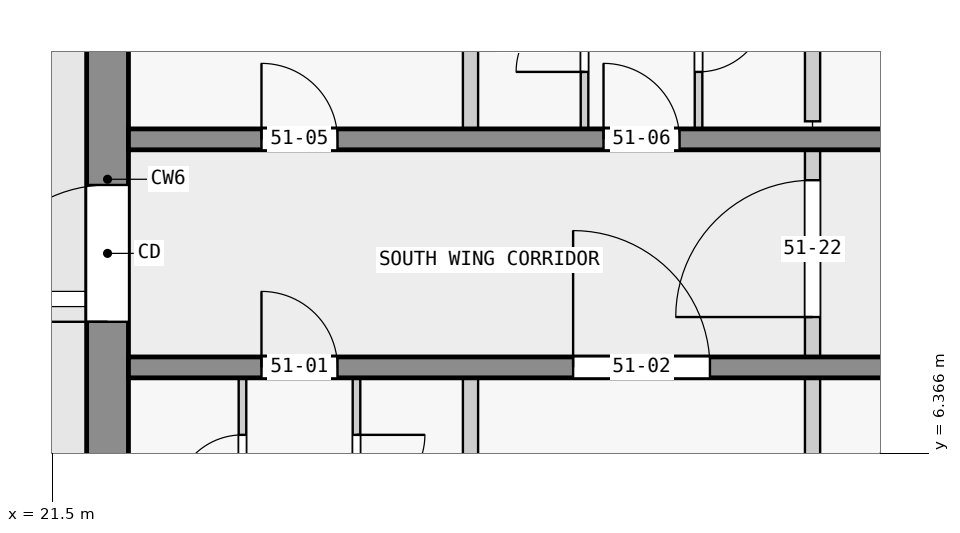
"""IFC4 building model, lengths in metres.
Left out: names, types, materials, properties, quantities, classifications, styles, units other than length and angle.
Written with IfcOpenShell. Run it as: python <this file> out.ifc"""

import sys

from ifc_helpers import new_model, si_unit, direction, frame, frame_2d, origin, place, context, subcontext, project, spatial, rectangle, extrude, element, fill, save


model = new_model("IFC4")
c1 = context("Model", 3, precision=1e-05, world=origin(), true_north=direction((0.0, 1.0)))
c2 = subcontext(c1, "Body", "Model", "MODEL_VIEW")
j1 = project(units=[si_unit("LENGTHUNIT", "METRE"), si_unit("PLANEANGLEUNIT", "RADIAN")], contexts=[c1])
p1 = place(None, origin())
s1 = spatial("IfcSite", under=j1, at=p1, CompositionType="ELEMENT")
p2 = place(p1, origin())
s2 = spatial("IfcBuilding", under=s1, at=p2, CompositionType="ELEMENT")
p3 = place(p2, frame((0.0, 0.0, 197.9)))
s3 = spatial("IfcBuildingStorey", under=s2, at=p3, CompositionType="ELEMENT", Elevation=197.9)
p4 = place(p3, frame((22.225, 2.5, 0.0), z_axis=(0.0, 0.0, 1.0), x_axis=(0.0, 1.0, 0.0)))
e1 = element("IfcWall", 1, at=p4, inside=s3, PredefinedType="SHEAR", context=c2, shape_type="SweptSolid", body=[
    extrude(rectangle(XDim=14.95, YDim=0.55, at=frame_2d((7.475, 0.0))), origin(), (0.0, 0.0, 1.0), 3.25),
])
p5 = place(p4, frame((5.6, 0.0, 0.0)))
e2 = element("IfcOpeningElement", 2, at=p5, cuts=e1, PredefinedType="OPENING", context=c2, shape_type="SweptSolid", body=[
    extrude(rectangle(XDim=1.8, YDim=2.1, at=frame_2d((0.9, 1.05))), frame((0.0, 0.285, 0.0), z_axis=(0.0, -1.0, 0.0), x_axis=(1.0, 0.0, 0.0)), (0.0, 0.0, 1.0), 0.57),
])
p6 = place(p3, frame((22.5, 7.5, 0.0), z_axis=(0.0, 0.0, 1.0), x_axis=(1.0, 0.0, 0.0)))
e3 = element("IfcWall", 3, at=p6, inside=s3, PredefinedType="SHEAR", context=c2, shape_type="SweptSolid", body=[
    extrude(rectangle(XDim=22.5, YDim=0.275, at=frame_2d((11.25, 0.0))), origin(), (0.0, 0.0, 1.0), 3.25),
])
p7 = place(p6, frame((1.75, 0.0, 0.0)))
e4 = element("IfcOpeningElement", 4, at=p7, cuts=e3, PredefinedType="OPENING", context=c2, shape_type="SweptSolid", body=[
    extrude(rectangle(XDim=1.0, YDim=2.1, at=frame_2d((0.5, 1.05))), frame((0.0, 0.147, 0.0), z_axis=(0.0, -1.0, 0.0), x_axis=(1.0, 0.0, 0.0)), (0.0, 0.0, 1.0), 0.295),
])
p8 = place(p6, frame((5.85, 0.0, 0.0)))
e5 = element("IfcOpeningElement", 5, at=p8, cuts=e3, PredefinedType="OPENING", context=c2, shape_type="SweptSolid", body=[
    extrude(rectangle(XDim=1.8, YDim=2.1, at=frame_2d((0.9, 1.05))), frame((0.0, 0.147, 0.0), z_axis=(0.0, -1.0, 0.0), x_axis=(1.0, 0.0, 0.0)), (0.0, 0.0, 1.0), 0.295),
])
p9 = place(p6, frame((10.75, 0.0, 0.0)))
e6 = element("IfcOpeningElement", 6, at=p9, cuts=e3, PredefinedType="OPENING", context=c2, shape_type="SweptSolid", body=[
    extrude(rectangle(XDim=1.0, YDim=2.1, at=frame_2d((0.5, 1.05))), frame((0.0, 0.147, 0.0), z_axis=(0.0, -1.0, 0.0), x_axis=(1.0, 0.0, 0.0)), (0.0, 0.0, 1.0), 0.295),
])
p10 = place(p6, frame((16.85, 0.0, 0.0)))
e7 = element("IfcOpeningElement", 7, at=p10, cuts=e3, PredefinedType="OPENING", context=c2, shape_type="SweptSolid", body=[
    extrude(rectangle(XDim=1.0, YDim=2.1, at=frame_2d((0.5, 1.05))), frame((0.0, 0.147, 0.0), z_axis=(0.0, -1.0, 0.0), x_axis=(1.0, 0.0, 0.0)), (0.0, 0.0, 1.0), 0.295),
])
p11 = place(p3, frame((22.5, 10.5, 0.0), z_axis=(0.0, 0.0, 1.0), x_axis=(1.0, 0.0, 0.0)))
e8 = element("IfcWall", 8, at=p11, inside=s3, PredefinedType="SHEAR", context=c2, shape_type="SweptSolid", body=[
    extrude(rectangle(XDim=22.5, YDim=0.275, at=frame_2d((11.25, 0.0))), origin(), (0.0, 0.0, 1.0), 3.25),
])
p12 = place(p11, frame((1.75, 0.0, 0.0)))
e9 = element("IfcOpeningElement", 9, at=p12, cuts=e8, PredefinedType="OPENING", context=c2, shape_type="SweptSolid", body=[
    extrude(rectangle(XDim=1.0, YDim=2.1, at=frame_2d((0.5, 1.05))), frame((0.0, 0.147, 0.0), z_axis=(0.0, -1.0, 0.0), x_axis=(1.0, 0.0, 0.0)), (0.0, 0.0, 1.0), 0.295),
])
p13 = place(p11, frame((6.25, 0.0, 0.0)))
e10 = element("IfcOpeningElement", 10, at=p13, cuts=e8, PredefinedType="OPENING", context=c2, shape_type="SweptSolid", body=[
    extrude(rectangle(XDim=1.0, YDim=2.1, at=frame_2d((0.5, 1.05))), frame((0.0, 0.147, 0.0), z_axis=(0.0, -1.0, 0.0), x_axis=(1.0, 0.0, 0.0)), (0.0, 0.0, 1.0), 0.295),
])
p14 = place(p11, frame((10.75, 0.0, 0.0)))
e11 = element("IfcOpeningElement", 11, at=p14, cuts=e8, PredefinedType="OPENING", context=c2, shape_type="SweptSolid", body=[
    extrude(rectangle(XDim=1.0, YDim=2.1, at=frame_2d((0.5, 1.05))), frame((0.0, 0.147, 0.0), z_axis=(0.0, -1.0, 0.0), x_axis=(1.0, 0.0, 0.0)), (0.0, 0.0, 1.0), 0.295),
])
p15 = place(p11, frame((15.25, 0.0, 0.0)))
e12 = element("IfcOpeningElement", 12, at=p15, cuts=e8, PredefinedType="OPENING", context=c2, shape_type="SweptSolid", body=[
    extrude(rectangle(XDim=1.0, YDim=2.1, at=frame_2d((0.5, 1.05))), frame((0.0, 0.147, 0.0), z_axis=(0.0, -1.0, 0.0), x_axis=(1.0, 0.0, 0.0)), (0.0, 0.0, 1.0), 0.295),
])
p16 = place(p11, frame((18.75, 0.0, 0.0)))
e13 = element("IfcOpeningElement", 13, at=p16, cuts=e8, PredefinedType="OPENING", context=c2, shape_type="SweptSolid", body=[
    extrude(rectangle(XDim=0.9, YDim=2.1, at=frame_2d((0.45, 1.05))), frame((0.0, 0.147, 0.0), z_axis=(0.0, -1.0, 0.0), x_axis=(1.0, 0.0, 0.0)), (0.0, 0.0, 1.0), 0.295),
])
p17 = place(p11, frame((20.95, 0.0, 0.0)))
e14 = element("IfcOpeningElement", 14, at=p17, cuts=e8, PredefinedType="OPENING", context=c2, shape_type="SweptSolid", body=[
    extrude(rectangle(XDim=1.0, YDim=2.1, at=frame_2d((0.5, 1.05))), frame((0.0, 0.147, 0.0), z_axis=(0.0, -1.0, 0.0), x_axis=(1.0, 0.0, 0.0)), (0.0, 0.0, 1.0), 0.295),
])
p18 = place(p3, frame((24.0, 4.962, 0.0), z_axis=(0.0, 0.0, 1.0), x_axis=(0.0, 1.0, 0.0)))
e15 = element("IfcWall", 15, at=p18, inside=s3, PredefinedType="PARTITIONING", context=c2, shape_type="SweptSolid", body=[
    extrude(rectangle(XDim=2.4, YDim=0.1, at=frame_2d((1.2, 0.0))), origin(), (0.0, 0.0, 1.0), 3.25),
])
p19 = place(p18, frame((0.75, 0.0, 0.0)))
e16 = element("IfcOpeningElement", 16, at=p19, cuts=e15, PredefinedType="OPENING", context=c2, shape_type="SweptSolid", body=[
    extrude(rectangle(XDim=0.9, YDim=2.1, at=frame_2d((0.45, 1.05))), frame((0.0, 0.06, 0.0), z_axis=(0.0, -1.0, 0.0), x_axis=(1.0, 0.0, 0.0)), (0.0, 0.0, 1.0), 0.12),
])
p20 = place(p3, frame((25.5, 7.363, 0.0), z_axis=(0.0, 0.0, 1.0), x_axis=(0.0, -1.0, 0.0)))
e17 = element("IfcWall", 17, at=p20, inside=s3, PredefinedType="PARTITIONING", context=c2, shape_type="SweptSolid", body=[
    extrude(rectangle(XDim=2.4, YDim=0.1, at=frame_2d((1.2, 0.0))), origin(), (0.0, 0.0, 1.0), 3.25),
])
p21 = place(p20, frame((0.75, 0.0, 0.0)))
e18 = element("IfcOpeningElement", 18, at=p21, cuts=e17, PredefinedType="OPENING", context=c2, shape_type="SweptSolid", body=[
    extrude(rectangle(XDim=0.9, YDim=2.1, at=frame_2d((0.45, 1.05))), frame((0.0, 0.06, 0.0), z_axis=(0.0, -1.0, 0.0), x_axis=(1.0, 0.0, 0.0)), (0.0, 0.0, 1.0), 0.12),
])
p22 = place(p3, frame((27.0, 5.062, 0.0), z_axis=(0.0, 0.0, 1.0), x_axis=(0.0, 1.0, 0.0)))
e19 = element("IfcWall", 19, at=p22, inside=s3, PredefinedType="PARTITIONING", context=c2, shape_type="SweptSolid", body=[
    extrude(rectangle(XDim=2.3, YDim=0.2, at=frame_2d((1.15, 0.0))), origin(), (0.0, 0.0, 1.0), 3.25),
])
p23 = place(p3, frame((27.0, 10.637, 0.0), z_axis=(0.0, 0.0, 1.0), x_axis=(0.0, 1.0, 0.0)))
e20 = element("IfcWall", 20, at=p23, inside=s3, PredefinedType="PARTITIONING", context=c2, shape_type="SweptSolid", body=[
    extrude(rectangle(XDim=5.836, YDim=0.2, at=frame_2d((2.918, 0.0))), origin(), (0.0, 0.0, 1.0), 3.25),
])
p24 = place(p3, frame((28.5, 10.637, 0.0), z_axis=(0.0, 0.0, 1.0), x_axis=(0.0, 1.0, 0.0)))
e21 = element("IfcWall", 21, at=p24, inside=s3, PredefinedType="PARTITIONING", context=c2, shape_type="SweptSolid", body=[
    extrude(rectangle(XDim=2.4, YDim=0.1, at=frame_2d((1.2, 0.0))), origin(), (0.0, 0.0, 1.0), 3.25),
])
p25 = place(p24, frame((0.75, 0.0, 0.0)))
e22 = element("IfcOpeningElement", 22, at=p25, cuts=e21, PredefinedType="OPENING", context=c2, shape_type="SweptSolid", body=[
    extrude(rectangle(XDim=0.9, YDim=2.1, at=frame_2d((0.45, 1.05))), frame((0.0, 0.06, 0.0), z_axis=(0.0, -1.0, 0.0), x_axis=(1.0, 0.0, 0.0)), (0.0, 0.0, 1.0), 0.12),
])
p26 = place(p3, frame((30.0, 13.038, 0.0), z_axis=(0.0, 0.0, 1.0), x_axis=(0.0, -1.0, 0.0)))
e23 = element("IfcWall", 23, at=p26, inside=s3, PredefinedType="PARTITIONING", context=c2, shape_type="SweptSolid", body=[
    extrude(rectangle(XDim=2.4, YDim=0.1, at=frame_2d((1.2, 0.0))), origin(), (0.0, 0.0, 1.0), 3.25),
])
p27 = place(p26, frame((0.75, 0.0, 0.0)))
e24 = element("IfcOpeningElement", 24, at=p27, cuts=e23, PredefinedType="OPENING", context=c2, shape_type="SweptSolid", body=[
    extrude(rectangle(XDim=0.9, YDim=2.1, at=frame_2d((0.45, 1.05))), frame((0.0, 0.06, 0.0), z_axis=(0.0, -1.0, 0.0), x_axis=(1.0, 0.0, 0.0)), (0.0, 0.0, 1.0), 0.12),
])
p28 = place(p3, frame((31.5, 1.122, 0.0), z_axis=(0.0, 0.0, 1.0), x_axis=(0.0, 1.0, 0.0)))
e25 = element("IfcWall", 25, at=p28, inside=s3, PredefinedType="PARTITIONING", context=c2, shape_type="SweptSolid", body=[
    extrude(rectangle(XDim=6.24, YDim=0.2, at=frame_2d((3.12, 0.0))), origin(), (0.0, 0.0, 1.0), 3.25),
])
p29 = place(p3, frame((31.5, 10.738, 0.0), z_axis=(0.0, 0.0, 1.0), x_axis=(0.0, 1.0, 0.0)))
e26 = element("IfcWall", 26, at=p29, inside=s3, PredefinedType="PARTITIONING", context=c2, shape_type="SweptSolid", body=[
    extrude(rectangle(XDim=2.2, YDim=0.2, at=frame_2d((1.1, 0.0))), origin(), (0.0, 0.0, 1.0), 3.25),
])
p30 = place(p3, frame((31.5, 7.462, 0.0), z_axis=(0.0, 0.0, 1.0), x_axis=(0.0, 1.0, 0.0)))
e27 = element("IfcWall", 27, at=p30, inside=s3, PredefinedType="PARTITIONING", context=c2, shape_type="SweptSolid", body=[
    extrude(rectangle(XDim=3.175, YDim=0.2, at=frame_2d((1.587, 0.0))), origin(), (0.0, 0.0, 1.0), 3.25),
])
p31 = place(p30, frame((0.7, 0.0, 0.0)))
e28 = element("IfcOpeningElement", 28, at=p31, cuts=e27, PredefinedType="OPENING", context=c2, shape_type="SweptSolid", body=[
    extrude(rectangle(XDim=1.8, YDim=2.1, at=frame_2d((0.9, 1.05))), frame((0.0, 0.11, 0.0), z_axis=(0.0, -1.0, 0.0), x_axis=(1.0, 0.0, 0.0)), (0.0, 0.0, 1.0), 0.22),
])
p32 = place(p5, origin())
e29 = element("IfcDoor", 29, at=p32, inside=s3, OperationType="DOUBLE_DOOR_SINGLE_SWING", PredefinedType="DOOR", context=c2, shape_type="SweptSolid", body=[
    extrude(rectangle(XDim=1.8, YDim=2.1, at=frame_2d((0.9, 1.05))), frame((0.0, 0.025, 0.0), z_axis=(0.0, -1.0, 0.0), x_axis=(1.0, 0.0, 0.0)), (0.0, 0.0, 1.0), 0.05),
])
fill(e2, e29)
p33 = place(p7, origin())
e30 = element("IfcDoor", 30, at=p33, inside=s3, OperationType="SINGLE_SWING_LEFT", PredefinedType="DOOR", context=c2, shape_type="SweptSolid", body=[
    extrude(rectangle(XDim=1.0, YDim=2.1, at=frame_2d((0.5, 1.05))), frame((0.0, 0.025, 0.0), z_axis=(0.0, -1.0, 0.0), x_axis=(1.0, 0.0, 0.0)), (0.0, 0.0, 1.0), 0.05),
])
fill(e4, e30)
p34 = place(p8, origin())
e31 = element("IfcDoor", 31, at=p34, inside=s3, OperationType="SINGLE_SWING_LEFT", PredefinedType="DOOR", context=c2, shape_type="SweptSolid", body=[
    extrude(rectangle(XDim=1.8, YDim=2.1, at=frame_2d((0.9, 1.05))), frame((0.0, 0.025, 0.0), z_axis=(0.0, -1.0, 0.0), x_axis=(1.0, 0.0, 0.0)), (0.0, 0.0, 1.0), 0.05),
])
fill(e5, e31)
p35 = place(p12, origin())
e32 = element("IfcDoor", 32, at=p35, inside=s3, OperationType="SINGLE_SWING_LEFT", PredefinedType="DOOR", context=c2, shape_type="SweptSolid", body=[
    extrude(rectangle(XDim=1.0, YDim=2.1, at=frame_2d((0.5, 1.05))), frame((0.0, 0.025, 0.0), z_axis=(0.0, -1.0, 0.0), x_axis=(1.0, 0.0, 0.0)), (0.0, 0.0, 1.0), 0.05),
])
fill(e9, e32)
p36 = place(p13, origin())
e33 = element("IfcDoor", 33, at=p36, inside=s3, OperationType="SINGLE_SWING_LEFT", PredefinedType="DOOR", context=c2, shape_type="SweptSolid", body=[
    extrude(rectangle(XDim=1.0, YDim=2.1, at=frame_2d((0.5, 1.05))), frame((0.0, 0.025, 0.0), z_axis=(0.0, -1.0, 0.0), x_axis=(1.0, 0.0, 0.0)), (0.0, 0.0, 1.0), 0.05),
])
fill(e10, e33)
p37 = place(p31, origin())
e34 = element("IfcDoor", 34, at=p37, inside=s3, OperationType="SINGLE_SWING_RIGHT", PredefinedType="DOOR", context=c2, shape_type="SweptSolid", body=[
    extrude(rectangle(XDim=1.8, YDim=2.1, at=frame_2d((0.9, 1.05))), frame((0.0, 0.025, 0.0), z_axis=(0.0, -1.0, 0.0), x_axis=(1.0, 0.0, 0.0)), (0.0, 0.0, 1.0), 0.05),
])
fill(e28, e34)
p38 = place(p19, origin())
e35 = element("IfcDoor", 35, at=p38, inside=s3, OperationType="SINGLE_SWING_RIGHT", PredefinedType="DOOR", context=c2, shape_type="SweptSolid", body=[
    extrude(rectangle(XDim=0.9, YDim=2.1, at=frame_2d((0.45, 1.05))), frame((0.0, 0.025, 0.0), z_axis=(0.0, -1.0, 0.0), x_axis=(1.0, 0.0, 0.0)), (0.0, 0.0, 1.0), 0.05),
])
fill(e16, e35)
p39 = place(p21, origin())
e36 = element("IfcDoor", 36, at=p39, inside=s3, OperationType="SINGLE_SWING_RIGHT", PredefinedType="DOOR", context=c2, shape_type="SweptSolid", body=[
    extrude(rectangle(XDim=0.9, YDim=2.1, at=frame_2d((0.45, 1.05))), frame((0.0, 0.025, 0.0), z_axis=(0.0, -1.0, 0.0), x_axis=(1.0, 0.0, 0.0)), (0.0, 0.0, 1.0), 0.05),
])
fill(e18, e36)
p40 = place(p25, origin())
e37 = element("IfcDoor", 37, at=p40, inside=s3, OperationType="SINGLE_SWING_LEFT", PredefinedType="DOOR", context=c2, shape_type="SweptSolid", body=[
    extrude(rectangle(XDim=0.9, YDim=2.1, at=frame_2d((0.45, 1.05))), frame((0.0, 0.025, 0.0), z_axis=(0.0, -1.0, 0.0), x_axis=(1.0, 0.0, 0.0)), (0.0, 0.0, 1.0), 0.05),
])
fill(e22, e37)
p41 = place(p27, origin())
e38 = element("IfcDoor", 38, at=p41, inside=s3, OperationType="SINGLE_SWING_LEFT", PredefinedType="DOOR", context=c2, shape_type="SweptSolid", body=[
    extrude(rectangle(XDim=0.9, YDim=2.1, at=frame_2d((0.45, 1.05))), frame((0.0, 0.025, 0.0), z_axis=(0.0, -1.0, 0.0), x_axis=(1.0, 0.0, 0.0)), (0.0, 0.0, 1.0), 0.05),
])
fill(e24, e38)
save(model, sys.argv[1])
